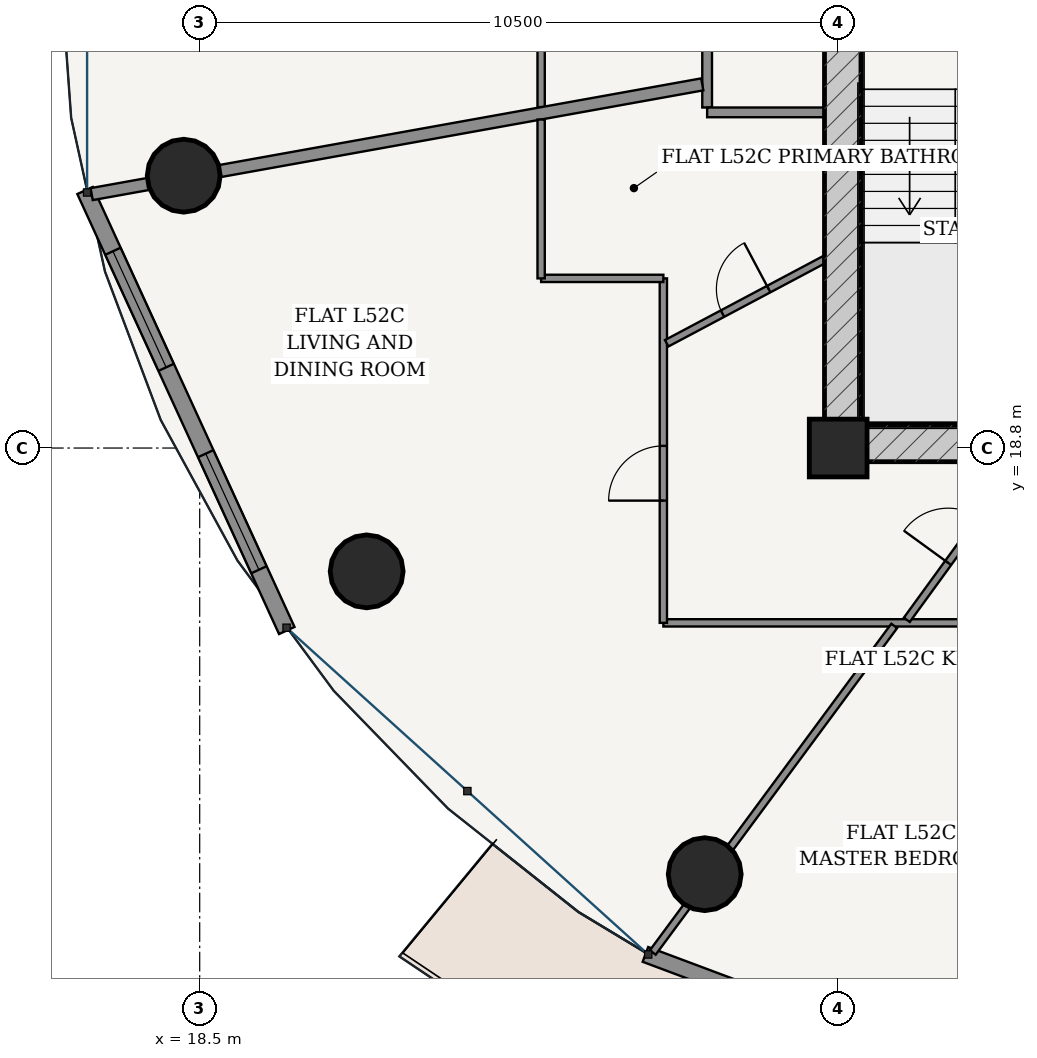
"""IFC4 building model, lengths in metres.
Left out: names, types, materials, properties, quantities, classifications, styles, units other than length and angle.
Written with IfcOpenShell. Run it as: python <this file> out.ifc"""

import sys

from ifc_helpers import new_model, si_unit, direction, frame, frame_2d, origin, origin_2d, place, context, subcontext, project, spatial, rectangle, hollow_circle, extrude, source, transform, mapped, element, fill, save


model = new_model("IFC4")
c1 = context("Model", 3, precision=1e-05, world=origin(), true_north=direction((-0.2419218956, 0.970295726276)))
c2 = subcontext(c1, "Body", "Model", "MODEL_VIEW")
j1 = project(units=[si_unit("LENGTHUNIT", "METRE"), si_unit("PLANEANGLEUNIT", "RADIAN")], contexts=[c1])
p1 = place(None, origin())
s1 = spatial("IfcSite", under=j1, at=p1, CompositionType="ELEMENT")
p2 = place(p1, origin())
s2 = spatial("IfcBuilding", under=s1, at=p2, CompositionType="ELEMENT")
p3 = place(p2, frame((0.0, 0.0, 198.6)))
s3 = spatial("IfcBuildingStorey", under=s2, at=p3, CompositionType="ELEMENT", Elevation=198.6)
p4 = place(p3, frame((29.0, 18.8, 0.0), z_axis=(0.0, 0.0, 1.0), x_axis=(1.0, 0.0, 0.0)))
e1 = element("IfcColumn", 1, at=p4, inside=s3, PredefinedType="COLUMN", context=c2, shape_type="SweptSolid", body=[
    extrude(rectangle(XDim=0.95, YDim=0.95, at=origin_2d()), origin(), (0.0, 0.0, 1.0), 3.7),
])
p5 = place(p3, frame((28.775, 18.875, 0.0), z_axis=(0.0, 0.0, 1.0), x_axis=(1.0, 0.0, 0.0)))
e2 = element("IfcWall", 2, at=p5, inside=s3, PredefinedType="SHEAR", context=c2, shape_type="SweptSolid", body=[
    extrude(rectangle(XDim=18.45, YDim=0.6, at=frame_2d((9.225, 0.0))), origin(), (0.0, 0.0, 1.0), 3.435),
])
p6 = place(p5, frame((8.8, 0.0, 0.0)))
e3 = element("IfcOpeningElement", 3, at=p6, cuts=e2, PredefinedType="OPENING", context=c2, shape_type="SweptSolid", body=[
    extrude(rectangle(XDim=0.85, YDim=2.1, at=frame_2d((0.425, 1.05))), frame((0.0, 0.31, 0.0), z_axis=(0.0, -1.0, 0.0), x_axis=(1.0, 0.0, 0.0)), (0.0, 0.0, 1.0), 0.62),
])
p7 = place(p3, frame((29.075, 19.175, 0.0), z_axis=(0.0, 0.0, 1.0), x_axis=(0.0, 1.0, 0.0)))
e4 = element("IfcWall", 4, at=p7, inside=s3, PredefinedType="SHEAR", context=c2, shape_type="SweptSolid", body=[
    extrude(rectangle(XDim=15.25, YDim=0.6, at=frame_2d((7.625, 0.0))), origin(), (0.0, 0.0, 1.0), 3.435),
])
p8 = place(p7, frame((9.875, 0.0, 0.0)))
e5 = element("IfcOpeningElement", 5, at=p8, cuts=e4, PredefinedType="OPENING", context=c2, shape_type="SweptSolid", body=[
    extrude(rectangle(XDim=1.5, YDim=2.2, at=frame_2d((0.75, 1.1))), frame((0.0, 0.31, 0.0), z_axis=(0.0, -1.0, 0.0), x_axis=(1.0, 0.0, 0.0)), (0.0, 0.0, 1.0), 0.62),
])
for number, where, z_axis, x_axis in (
    (6, (18.237, 23.279, 0.0), (0.0, 0.0, 1.0), (1.0, 0.0, 0.0)),
    (7, (21.246, 16.772, 0.0), (0.0, 0.0, 1.0), (1.0, 0.0, 0.0)),
    (8, (26.805, 11.792, 0.0), (0.0, 0.0, 1.0), (1.0, 0.0, 0.0)),
):
    element("IfcColumn", number, at=place(p3, frame(where, z_axis=z_axis, x_axis=x_axis)), inside=s3, PredefinedType="COLUMN", context=c2, shape_type="SweptSolid", body=[
        extrude(hollow_circle(Radius=0.6, WallThickness=0.038, at=origin_2d()), origin(), (0.0, 0.0, 1.0), 3.7),
    ])
p9 = place(p3, frame((16.615, 23.035, 0.0), z_axis=(0.0, 0.0, 1.0), x_axis=(0.416717018135, -0.909036262641, 0.0)))
e9 = element("IfcWall", 9, at=p9, inside=s3, PredefinedType="SOLIDWALL", context=c2, shape_type="SweptSolid", body=[
    extrude(rectangle(XDim=7.96, YDim=0.28, at=frame_2d((3.98, 0.0))), origin(), (0.0, 0.0, 1.0), 3.435),
])
p10 = place(p9, frame((1.099, 0.0, 0.85)))
e10 = element("IfcOpeningElement", 10, at=p10, cuts=e9, PredefinedType="OPENING", context=c2, shape_type="SweptSolid", body=[
    extrude(rectangle(XDim=2.1, YDim=1.95, at=frame_2d((1.05, 0.975))), frame((0.0, 0.15, 0.0), z_axis=(0.0, -1.0, 0.0), x_axis=(1.0, 0.0, 0.0)), (0.0, 0.0, 1.0), 0.3),
])
p11 = place(p9, frame((4.761, 0.0, 0.85)))
e11 = element("IfcOpeningElement", 11, at=p11, cuts=e9, PredefinedType="OPENING", context=c2, shape_type="SweptSolid", body=[
    extrude(rectangle(XDim=2.1, YDim=1.95, at=frame_2d((1.05, 0.975))), frame((0.0, 0.15, 0.0), z_axis=(0.0, -1.0, 0.0), x_axis=(1.0, 0.0, 0.0)), (0.0, 0.0, 1.0), 0.3),
])
p12 = place(p3, frame((25.83, 10.473, 0.0), z_axis=(0.0, 0.0, 1.0), x_axis=(0.936556918375, -0.350515532672, 0.0)))
e12 = element("IfcWall", 12, at=p12, inside=s3, PredefinedType="SOLIDWALL", context=c2, shape_type="SweptSolid", body=[
    extrude(rectangle(XDim=8.539, YDim=0.26, at=frame_2d((4.27, 0.0))), origin(), (0.0, 0.0, 1.0), 3.435),
])
p13 = place(p12, frame((3.594, 0.0, 0.0)))
e13 = element("IfcOpeningElement", 13, at=p13, cuts=e12, PredefinedType="OPENING", context=c2, shape_type="SweptSolid", body=[
    extrude(rectangle(XDim=1.35, YDim=2.2, at=frame_2d((0.675, 1.1))), frame((0.0, 0.14, 0.0), z_axis=(0.0, -1.0, 0.0), x_axis=(1.0, 0.0, 0.0)), (0.0, 0.0, 1.0), 0.28),
])
p14 = place(p3, frame((26.845, 24.4, 0.0), z_axis=(0.0, 0.0, 1.0), x_axis=(0.0, 1.0, 0.0)))
e14 = element("IfcWall", 14, at=p14, inside=s3, PredefinedType="PARTITIONING", context=c2, shape_type="SweptSolid", body=[
    extrude(rectangle(XDim=10.625, YDim=0.16, at=frame_2d((5.312, 0.0))), origin(), (0.0, 0.0, 1.0), 2.951),
])
p15 = place(p3, frame((26.845, 24.32, 0.0), z_axis=(0.0, 0.0, 1.0), x_axis=(1.0, 0.0, 0.0)))
e15 = element("IfcWall", 15, at=p15, inside=s3, PredefinedType="PARTITIONING", context=c2, shape_type="SweptSolid", body=[
    extrude(rectangle(XDim=1.93, YDim=0.16, at=frame_2d((0.965, 0.0))), origin(), (0.0, 0.0, 1.0), 3.435),
])
p16 = place(p3, frame((24.115, 24.406, 0.0), z_axis=(0.0, 0.0, 1.0), x_axis=(0.0, 1.0, 0.0)))
e16 = element("IfcWall", 16, at=p16, inside=s3, PredefinedType="PARTITIONING", context=c2, shape_type="SweptSolid", body=[
    extrude(rectangle(XDim=13.429, YDim=0.12, at=frame_2d((6.714, 0.0))), origin(), (0.0, 0.0, 1.0), 2.951),
])
p17 = place(p16, frame((9.641, 0.0, 0.0)))
e17 = element("IfcOpeningElement", 17, at=p17, cuts=e16, PredefinedType="OPENING", context=c2, shape_type="SweptSolid", body=[
    extrude(rectangle(XDim=0.9, YDim=2.15, at=frame_2d((0.45, 1.075))), frame((0.0, 0.07, 0.0), z_axis=(0.0, -1.0, 0.0), x_axis=(1.0, 0.0, 0.0)), (0.0, 0.0, 1.0), 0.14),
])
p18 = place(p3, frame((26.765, 24.781, 0.0), z_axis=(0.0, 0.0, 1.0), x_axis=(-0.984226684914, -0.176911934879, 0.0)))
e18 = element("IfcWall", 18, at=p18, inside=s3, PredefinedType="PARTITIONING", context=c2, shape_type="SweptSolid", body=[
    extrude(rectangle(XDim=10.202, YDim=0.2, at=frame_2d((5.101, 0.0))), origin(), (0.0, 0.0, 1.0), 2.951),
])
p19 = place(p3, frame((31.59, 15.925, 0.0), z_axis=(0.0, 0.0, 1.0), x_axis=(-1.0, 0.0, 0.0)))
e19 = element("IfcWall", 19, at=p19, inside=s3, PredefinedType="PARTITIONING", context=c2, shape_type="SweptSolid", body=[
    extrude(rectangle(XDim=5.465, YDim=0.12, at=frame_2d((2.732, 0.0))), origin(), (0.0, 0.0, 1.0), 2.951),
])
p20 = place(p3, frame((26.125, 15.925, 0.0), z_axis=(0.0, 0.0, 1.0), x_axis=(0.0, 1.0, 0.0)))
e20 = element("IfcWall", 20, at=p20, inside=s3, PredefinedType="PARTITIONING", context=c2, shape_type="SweptSolid", body=[
    extrude(rectangle(XDim=5.665, YDim=0.12, at=frame_2d((2.833, 0.0))), origin(), (0.0, 0.0, 1.0), 2.951),
])
p21 = place(p20, frame((2.01, 0.0, 0.0)))
e21 = element("IfcOpeningElement", 21, at=p21, cuts=e20, PredefinedType="OPENING", context=c2, shape_type="SweptSolid", body=[
    extrude(rectangle(XDim=0.9, YDim=2.15, at=frame_2d((0.45, 1.075))), frame((0.0, 0.07, 0.0), z_axis=(0.0, -1.0, 0.0), x_axis=(1.0, 0.0, 0.0)), (0.0, 0.0, 1.0), 0.14),
])
p22 = place(p3, frame((26.125, 21.59, 0.0), z_axis=(0.0, 0.0, 1.0), x_axis=(-1.0, 0.0, 0.0)))
e22 = element("IfcWall", 22, at=p22, inside=s3, PredefinedType="PARTITIONING", context=c2, shape_type="SweptSolid", body=[
    extrude(rectangle(XDim=2.01, YDim=0.12, at=frame_2d((1.005, 0.0))), origin(), (0.0, 0.0, 1.0), 3.11),
])
p23 = place(p3, frame((24.115, 21.59, 0.0), z_axis=(0.0, 0.0, 1.0), x_axis=(0.0, 1.0, 0.0)))
e23 = element("IfcWall", 23, at=p23, inside=s3, PredefinedType="PARTITIONING", context=c2, shape_type="SweptSolid", body=[
    extrude(rectangle(XDim=2.612, YDim=0.12, at=frame_2d((1.306, 0.0))), origin(), (0.0, 0.0, 1.0), 3.11),
])
p24 = place(p3, frame((29.922, 15.875, 0.0), z_axis=(0.0, 0.0, 1.0), x_axis=(-0.594524636617, -0.804077394568, 0.0)))
e24 = element("IfcWall", 24, at=p24, inside=s3, PredefinedType="PARTITIONING", context=c2, shape_type="SweptSolid", body=[
    extrude(rectangle(XDim=6.68, YDim=0.12, at=frame_2d((3.34, 0.0))), origin(), (0.0, 0.0, 1.0), 2.951),
])
p25 = place(p3, frame((28.775, 21.901, 0.0), z_axis=(0.0, 0.0, 1.0), x_axis=(-0.883156592468, -0.46907828044, 0.0)))
e25 = element("IfcWall", 25, at=p25, inside=s3, PredefinedType="PARTITIONING", context=c2, shape_type="SweptSolid", body=[
    extrude(rectangle(XDim=2.938, YDim=0.12, at=frame_2d((1.469, 0.0))), origin(), (0.0, 0.0, 1.0), 3.435),
])
p26 = place(p25, frame((1.039, 0.0, 0.0)))
e26 = element("IfcOpeningElement", 26, at=p26, cuts=e25, PredefinedType="OPENING", context=c2, shape_type="SweptSolid", body=[
    extrude(rectangle(XDim=0.86, YDim=2.15, at=frame_2d((0.43, 1.075))), frame((0.0, 0.07, 0.0), z_axis=(0.0, -1.0, 0.0), x_axis=(1.0, 0.0, 0.0)), (0.0, 0.0, 1.0), 0.14),
])
p27 = place(p3, frame((32.019, 18.575, 0.0), z_axis=(0.0, 0.0, 1.0), x_axis=(-0.588135570825, -0.808762357143, 0.0)))
e27 = element("IfcWall", 27, at=p27, inside=s3, PredefinedType="PARTITIONING", context=c2, shape_type="SweptSolid", body=[
    extrude(rectangle(XDim=3.215, YDim=0.12, at=frame_2d((1.607, 0.0))), origin(), (0.0, 0.0, 1.0), 3.435),
])
p28 = place(p27, frame((1.157, 0.0, 0.0)))
e28 = element("IfcOpeningElement", 28, at=p28, cuts=e27, PredefinedType="OPENING", context=c2, shape_type="SweptSolid", body=[
    extrude(rectangle(XDim=0.9, YDim=2.15, at=frame_2d((0.45, 1.075))), frame((0.0, 0.07, 0.0), z_axis=(0.0, -1.0, 0.0), x_axis=(1.0, 0.0, 0.0)), (0.0, 0.0, 1.0), 0.14),
])
m1 = source(origin(), c2, "Body", "SweptSolid", [
    extrude(rectangle(XDim=2.1, YDim=1.95, at=frame_2d((1.05, 0.975))), frame((0.0, 0.03, 0.0), z_axis=(0.0, -1.0, 0.0), x_axis=(1.0, 0.0, 0.0)), (0.0, 0.0, 1.0), 0.06),
])
p29 = place(p10, origin())
e29 = element("IfcWindow", 29, at=p29, inside=s3, PartitioningType="SINGLE_PANEL", PredefinedType="WINDOW", context=c2, shape_type="MappedRepresentation", body=[
    mapped(m1, transform((0.0, 0.0, 0.0), scale=1.0)),
])
fill(e10, e29)
p30 = place(p11, origin())
e30 = element("IfcWindow", 30, at=p30, inside=s3, PartitioningType="SINGLE_PANEL", PredefinedType="WINDOW", context=c2, shape_type="MappedRepresentation", body=[
    mapped(m1, transform((0.0, 0.0, 0.0), scale=1.0)),
])
fill(e11, e30)
m2 = source(origin(), c2, "Body", "SweptSolid", [
    extrude(rectangle(XDim=0.9, YDim=2.15, at=frame_2d((0.45, 1.075))), frame((0.0, 0.025, 0.0), z_axis=(0.0, -1.0, 0.0), x_axis=(1.0, 0.0, 0.0)), (0.0, 0.0, 1.0), 0.05),
])
p31 = place(p28, frame((0.9, 0.0, 0.0), z_axis=(0.0, 0.0, 1.0), x_axis=(-1.0, 0.0, 0.0)))
e31 = element("IfcDoor", 31, at=p31, inside=s3, OperationType="SINGLE_SWING_LEFT", PredefinedType="DOOR", context=c2, shape_type="MappedRepresentation", body=[
    mapped(m2, transform((0.0, 0.0, 0.0), scale=1.0)),
])
fill(e28, e31)
m3 = source(origin(), c2, "Body", "SweptSolid", [
    extrude(rectangle(XDim=0.86, YDim=2.15, at=frame_2d((0.43, 1.075))), frame((0.0, 0.025, 0.0), z_axis=(0.0, -1.0, 0.0), x_axis=(1.0, 0.0, 0.0)), (0.0, 0.0, 1.0), 0.05),
])
p32 = place(p26, frame((0.86, 0.0, 0.0), z_axis=(0.0, 0.0, 1.0), x_axis=(-1.0, 0.0, 0.0)))
e32 = element("IfcDoor", 32, at=p32, inside=s3, OperationType="SINGLE_SWING_RIGHT", PredefinedType="DOOR", context=c2, shape_type="MappedRepresentation", body=[
    mapped(m3, transform((0.0, 0.0, 0.0), scale=1.0)),
])
fill(e26, e32)
p33 = place(p21, origin())
e33 = element("IfcDoor", 33, at=p33, inside=s3, OperationType="SINGLE_SWING_LEFT", PredefinedType="DOOR", context=c2, shape_type="MappedRepresentation", body=[
    mapped(m2, transform((0.0, 0.0, 0.0), scale=1.0)),
])
fill(e21, e33)
save(model, sys.argv[1])
